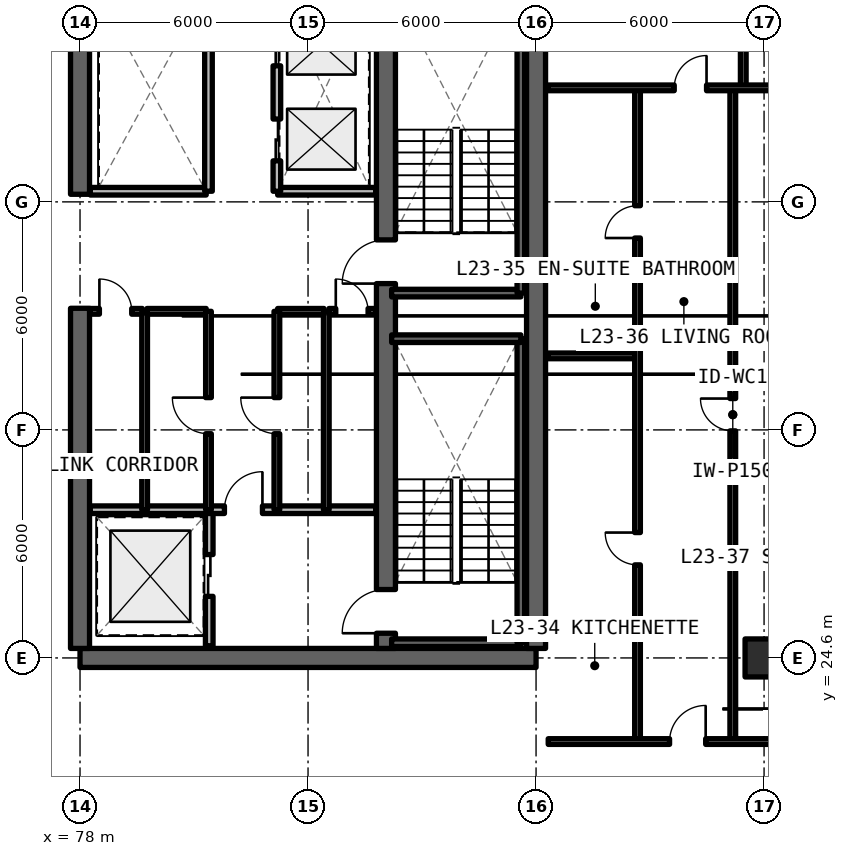
"""IFC4 building model, lengths in metres.
Left out: names, types, materials, properties, quantities, classifications, styles, units other than length and angle.
Written with IfcOpenShell. Run it as: python <this file> out.ifc"""

import sys

from ifc_helpers import new_model, si_unit, direction, frame, frame_2d, origin, origin_2d, place, context, subcontext, project, spatial, rectangle, extrude, element, fill, save


model = new_model("IFC4")
c1 = context("Model", 3, precision=1e-05, world=origin(), true_north=direction((0.0, 1.0)))
c2 = subcontext(c1, "Body", "Model", "MODEL_VIEW")
j1 = project(units=[si_unit("LENGTHUNIT", "METRE"), si_unit("PLANEANGLEUNIT", "RADIAN")], contexts=[c1])
p1 = place(None, origin())
s1 = spatial("IfcSite", under=j1, at=p1, CompositionType="ELEMENT")
p2 = place(p1, origin())
s2 = spatial("IfcBuilding", under=s1, at=p2, CompositionType="ELEMENT")
p3 = place(p2, frame((0.0, 0.0, 85.47)))
s3 = spatial("IfcBuildingStorey", under=s2, at=p3, CompositionType="ELEMENT", Elevation=85.47)
p4 = place(p3, frame((78.0, 24.6, 0.0), z_axis=(0.0, 0.0, 1.0), x_axis=(1.0, 0.0, 0.0)))
e1 = element("IfcWall", 1, at=p4, inside=s3, PredefinedType="SHEAR", context=c2, shape_type="SweptSolid", body=[
    extrude(rectangle(XDim=12.0, YDim=0.5, at=frame_2d((6.0, 0.0))), origin(), (0.0, 0.0, 1.0), 3.3),
])
p5 = place(p3, frame((90.0, 24.85, 0.0), z_axis=(0.0, 0.0, 1.0), x_axis=(0.0, 1.0, 0.0)))
e2 = element("IfcWall", 2, at=p5, inside=s3, PredefinedType="SHEAR", context=c2, shape_type="SweptSolid", body=[
    extrude(rectangle(XDim=17.5, YDim=0.5, at=frame_2d((8.75, 0.0))), origin(), (0.0, 0.0, 1.0), 3.3),
])
p6 = place(p3, frame((78.0, 24.85, 0.0), z_axis=(0.0, 0.0, 1.0), x_axis=(0.0, 1.0, 0.0)))
e3 = element("IfcWall", 3, at=p6, inside=s3, PredefinedType="SHEAR", context=c2, shape_type="SweptSolid", body=[
    extrude(rectangle(XDim=8.95, YDim=0.5, at=frame_2d((4.475, 0.0))), origin(), (0.0, 0.0, 1.0), 3.3),
])
p7 = place(p3, frame((78.0, 36.8, 0.0), z_axis=(0.0, 0.0, 1.0), x_axis=(0.0, 1.0, 0.0)))
e4 = element("IfcWall", 4, at=p7, inside=s3, PredefinedType="SHEAR", context=c2, shape_type="SweptSolid", body=[
    extrude(rectangle(XDim=5.55, YDim=0.5, at=frame_2d((2.775, 0.0))), origin(), (0.0, 0.0, 1.0), 3.3),
])
p8 = place(p3, frame((86.05, 24.85, 0.0), z_axis=(0.0, 0.0, 1.0), x_axis=(0.0, 1.0, 0.0)))
e5 = element("IfcWall", 5, at=p8, inside=s3, PredefinedType="SHEAR", context=c2, shape_type="SweptSolid", body=[
    extrude(rectangle(XDim=17.5, YDim=0.5, at=frame_2d((8.75, 0.0))), origin(), (0.0, 0.0, 1.0), 3.3),
])
p9 = place(p8, frame((0.4, 0.0, 0.0)))
e6 = element("IfcOpeningElement", 6, at=p9, cuts=e5, PredefinedType="OPENING", context=c2, shape_type="SweptSolid", body=[
    extrude(rectangle(XDim=1.15, YDim=2.15, at=frame_2d((0.575, 1.075))), frame((0.0, 0.26, 0.0), z_axis=(0.0, -1.0, 0.0), x_axis=(1.0, 0.0, 0.0)), (0.0, 0.0, 1.0), 0.52),
])
p10 = place(p8, frame((9.6, 0.0, 0.0)))
e7 = element("IfcOpeningElement", 7, at=p10, cuts=e5, PredefinedType="OPENING", context=c2, shape_type="SweptSolid", body=[
    extrude(rectangle(XDim=1.15, YDim=2.15, at=frame_2d((0.575, 1.075))), frame((0.0, 0.26, 0.0), z_axis=(0.0, -1.0, 0.0), x_axis=(1.0, 0.0, 0.0)), (0.0, 0.0, 1.0), 0.52),
])
p11 = place(p3, frame((96.0, 24.6, 0.0), z_axis=(0.0, 0.0, 1.0), x_axis=(1.0, 0.0, 0.0)))
e8 = element("IfcColumn", 8, at=p11, inside=s3, PredefinedType="COLUMN", context=c2, shape_type="SweptSolid", body=[
    extrude(rectangle(XDim=1.0, YDim=1.0, at=origin_2d()), origin(), (0.0, 0.0, 1.0), 3.3),
])
p12 = place(p3, frame((81.4, 24.92, 0.0), z_axis=(0.0, 0.0, 1.0), x_axis=(0.0, 1.0, 0.0)))
e9 = element("IfcWall", 9, at=p12, inside=s3, PredefinedType="SOLIDWALL", context=c2, shape_type="SweptSolid", body=[
    extrude(rectangle(XDim=3.58, YDim=0.2, at=frame_2d((1.79, 0.0))), origin(), (0.0, 0.0, 1.0), 2.35),
])
p13 = place(p12, frame((1.3, 0.0, 0.0)))
e10 = element("IfcOpeningElement", 10, at=p13, cuts=e9, PredefinedType="OPENING", context=c2, shape_type="SweptSolid", body=[
    extrude(rectangle(XDim=1.1, YDim=2.2, at=frame_2d((0.55, 1.1))), frame((0.0, 0.11, 0.0), z_axis=(0.0, -1.0, 0.0), x_axis=(1.0, 0.0, 0.0)), (0.0, 0.0, 1.0), 0.22),
])
p14 = place(p3, frame((78.27, 28.5, 0.0), z_axis=(0.0, 0.0, 1.0), x_axis=(1.0, 0.0, 0.0)))
e11 = element("IfcWall", 11, at=p14, inside=s3, PredefinedType="SOLIDWALL", context=c2, shape_type="SweptSolid", body=[
    extrude(rectangle(XDim=7.51, YDim=0.2, at=frame_2d((3.755, 0.0))), origin(), (0.0, 0.0, 1.0), 2.35),
])
p15 = place(p14, frame((3.53, 0.0, 0.0)))
e12 = element("IfcOpeningElement", 12, at=p15, cuts=e11, PredefinedType="OPENING", context=c2, shape_type="SweptSolid", body=[
    extrude(rectangle(XDim=1.0, YDim=2.15, at=frame_2d((0.5, 1.075))), frame((0.0, 0.11, 0.0), z_axis=(0.0, -1.0, 0.0), x_axis=(1.0, 0.0, 0.0)), (0.0, 0.0, 1.0), 0.22),
])
p16 = place(p3, frame((84.48, 28.5, 0.0), z_axis=(0.0, 0.0, 1.0), x_axis=(0.0, 1.0, 0.0)))
e13 = element("IfcWall", 13, at=p16, inside=s3, PredefinedType="SOLIDWALL", context=c2, shape_type="SweptSolid", body=[
    extrude(rectangle(XDim=5.22, YDim=0.15, at=frame_2d((2.61, 0.0))), origin(), (0.0, 0.0, 1.0), 2.35),
])
p17 = place(p3, frame((84.55, 33.72, 0.0), z_axis=(0.0, 0.0, 1.0), x_axis=(1.0, 0.0, 0.0)))
e14 = element("IfcWall", 14, at=p17, inside=s3, PredefinedType="SOLIDWALL", context=c2, shape_type="SweptSolid", body=[
    extrude(rectangle(XDim=1.23, YDim=0.15, at=frame_2d((0.615, 0.0))), origin(), (0.0, 0.0, 1.0), 2.35),
])
p18 = place(p17, frame((0.18, 0.0, 0.0)))
e15 = element("IfcOpeningElement", 15, at=p18, cuts=e14, PredefinedType="OPENING", context=c2, shape_type="SweptSolid", body=[
    extrude(rectangle(XDim=0.85, YDim=2.1, at=frame_2d((0.425, 1.05))), frame((0.0, 0.085, 0.0), z_axis=(0.0, -1.0, 0.0), x_axis=(1.0, 0.0, 0.0)), (0.0, 0.0, 1.0), 0.17),
])
p19 = place(p3, frame((83.2, 33.72, 0.0), z_axis=(0.0, 0.0, 1.0), x_axis=(1.0, 0.0, 0.0)))
e16 = element("IfcWall", 16, at=p19, inside=s3, PredefinedType="SOLIDWALL", context=c2, shape_type="SweptSolid", body=[
    extrude(rectangle(XDim=1.22, YDim=0.15, at=frame_2d((0.61, 0.0))), origin(), (0.0, 0.0, 1.0), 2.35),
])
p20 = place(p3, frame((83.18, 28.5, 0.0), z_axis=(0.0, 0.0, 1.0), x_axis=(0.0, 1.0, 0.0)))
e17 = element("IfcWall", 17, at=p20, inside=s3, PredefinedType="SOLIDWALL", context=c2, shape_type="SweptSolid", body=[
    extrude(rectangle(XDim=5.22, YDim=0.15, at=frame_2d((2.61, 0.0))), origin(), (0.0, 0.0, 1.0), 2.35),
])
p21 = place(p20, frame((2.0, 0.0, 0.0)))
e18 = element("IfcOpeningElement", 18, at=p21, cuts=e17, PredefinedType="OPENING", context=c2, shape_type="SweptSolid", body=[
    extrude(rectangle(XDim=0.95, YDim=2.15, at=frame_2d((0.475, 1.075))), frame((0.0, 0.085, 0.0), z_axis=(0.0, -1.0, 0.0), x_axis=(1.0, 0.0, 0.0)), (0.0, 0.0, 1.0), 0.17),
])
p22 = place(p3, frame((79.7, 28.5, 0.0), z_axis=(0.0, 0.0, 1.0), x_axis=(0.0, 1.0, 0.0)))
e19 = element("IfcWall", 19, at=p22, inside=s3, PredefinedType="SOLIDWALL", context=c2, shape_type="SweptSolid", body=[
    extrude(rectangle(XDim=5.22, YDim=0.15, at=frame_2d((2.61, 0.0))), origin(), (0.0, 0.0, 1.0), 2.35),
])
p23 = place(p3, frame((79.76, 33.72, 0.0), z_axis=(0.0, 0.0, 1.0), x_axis=(1.0, 0.0, 0.0)))
e20 = element("IfcWall", 20, at=p23, inside=s3, PredefinedType="SOLIDWALL", context=c2, shape_type="SweptSolid", body=[
    extrude(rectangle(XDim=1.56, YDim=0.15, at=frame_2d((0.78, 0.0))), origin(), (0.0, 0.0, 1.0), 2.35),
])
p24 = place(p3, frame((78.27, 33.72, 0.0), z_axis=(0.0, 0.0, 1.0), x_axis=(1.0, 0.0, 0.0)))
e21 = element("IfcWall", 21, at=p24, inside=s3, PredefinedType="SOLIDWALL", context=c2, shape_type="SweptSolid", body=[
    extrude(rectangle(XDim=1.37, YDim=0.15, at=frame_2d((0.685, 0.0))), origin(), (0.0, 0.0, 1.0), 2.35),
])
p25 = place(p24, frame((0.24, 0.0, 0.0)))
e22 = element("IfcOpeningElement", 22, at=p25, cuts=e21, PredefinedType="OPENING", context=c2, shape_type="SweptSolid", body=[
    extrude(rectangle(XDim=0.85, YDim=2.1, at=frame_2d((0.425, 1.05))), frame((0.0, 0.085, 0.0), z_axis=(0.0, -1.0, 0.0), x_axis=(1.0, 0.0, 0.0)), (0.0, 0.0, 1.0), 0.17),
])
p26 = place(p3, frame((81.38, 28.5, 0.0), z_axis=(0.0, 0.0, 1.0), x_axis=(0.0, 1.0, 0.0)))
e23 = element("IfcWall", 23, at=p26, inside=s3, PredefinedType="SOLIDWALL", context=c2, shape_type="SweptSolid", body=[
    extrude(rectangle(XDim=5.22, YDim=0.15, at=frame_2d((2.61, 0.0))), origin(), (0.0, 0.0, 1.0), 2.35),
])
p27 = place(p26, frame((2.0, 0.0, 0.0)))
e24 = element("IfcOpeningElement", 24, at=p27, cuts=e23, PredefinedType="OPENING", context=c2, shape_type="SweptSolid", body=[
    extrude(rectangle(XDim=0.95, YDim=2.15, at=frame_2d((0.475, 1.075))), frame((0.0, 0.085, 0.0), z_axis=(0.0, -1.0, 0.0), x_axis=(1.0, 0.0, 0.0)), (0.0, 0.0, 1.0), 0.17),
])
p28 = place(p3, frame((83.2, 36.88, 0.0), z_axis=(0.0, 0.0, 1.0), x_axis=(1.0, 0.0, 0.0)))
e25 = element("IfcWall", 25, at=p28, inside=s3, PredefinedType="SOLIDWALL", context=c2, shape_type="SweptSolid", body=[
    extrude(rectangle(XDim=2.58, YDim=0.2, at=frame_2d((1.29, 0.0))), origin(), (0.0, 0.0, 1.0), 2.35),
])
p29 = place(p3, frame((83.18, 36.88, 0.0), z_axis=(0.0, 0.0, 1.0), x_axis=(0.0, 1.0, 0.0)))
e26 = element("IfcWall", 26, at=p29, inside=s3, PredefinedType="SOLIDWALL", context=c2, shape_type="SweptSolid", body=[
    extrude(rectangle(XDim=5.42, YDim=0.2, at=frame_2d((2.71, 0.0))), origin(), (0.0, 0.0, 1.0), 2.35),
])
p30 = place(p29, frame((0.8, 0.0, 0.0)))
e27 = element("IfcOpeningElement", 27, at=p30, cuts=e26, PredefinedType="OPENING", context=c2, shape_type="SweptSolid", body=[
    extrude(rectangle(XDim=1.1, YDim=2.2, at=frame_2d((0.55, 1.1))), frame((0.0, 0.11, 0.0), z_axis=(0.0, -1.0, 0.0), x_axis=(1.0, 0.0, 0.0)), (0.0, 0.0, 1.0), 0.22),
])
p31 = place(p29, frame((3.3, 0.0, 0.0)))
e28 = element("IfcOpeningElement", 28, at=p31, cuts=e26, PredefinedType="OPENING", context=c2, shape_type="SweptSolid", body=[
    extrude(rectangle(XDim=1.1, YDim=2.2, at=frame_2d((0.55, 1.1))), frame((0.0, 0.11, 0.0), z_axis=(0.0, -1.0, 0.0), x_axis=(1.0, 0.0, 0.0)), (0.0, 0.0, 1.0), 0.22),
])
p32 = place(p3, frame((78.27, 36.88, 0.0), z_axis=(0.0, 0.0, 1.0), x_axis=(1.0, 0.0, 0.0)))
e29 = element("IfcWall", 29, at=p32, inside=s3, PredefinedType="SOLIDWALL", context=c2, shape_type="SweptSolid", body=[
    extrude(rectangle(XDim=3.05, YDim=0.2, at=frame_2d((1.525, 0.0))), origin(), (0.0, 0.0, 1.0), 2.35),
])
p33 = place(p3, frame((81.38, 36.88, 0.0), z_axis=(0.0, 0.0, 1.0), x_axis=(0.0, 1.0, 0.0)))
e30 = element("IfcWall", 30, at=p33, inside=s3, PredefinedType="SOLIDWALL", context=c2, shape_type="SweptSolid", body=[
    extrude(rectangle(XDim=5.42, YDim=0.2, at=frame_2d((2.71, 0.0))), origin(), (0.0, 0.0, 1.0), 2.35),
])
p34 = place(p3, frame((95.177, 22.4, 0.0), z_axis=(0.0, 0.0, 1.0), x_axis=(0.0, 1.0, 0.0)))
e31 = element("IfcWall", 31, at=p34, inside=s3, PredefinedType="PARTITIONING", context=c2, shape_type="SweptSolid", body=[
    extrude(rectangle(XDim=17.2, YDim=0.15, at=frame_2d((8.6, 0.0))), origin(), (0.0, 0.0, 1.0), 2.35),
])
p35 = place(p34, frame((8.175, 0.0, 0.0)))
e32 = element("IfcOpeningElement", 32, at=p35, cuts=e31, PredefinedType="OPENING", context=c2, shape_type="SweptSolid", body=[
    extrude(rectangle(XDim=0.85, YDim=2.1, at=frame_2d((0.425, 1.05))), frame((0.0, 0.085, 0.0), z_axis=(0.0, -1.0, 0.0), x_axis=(1.0, 0.0, 0.0)), (0.0, 0.0, 1.0), 0.17),
])
p36 = place(p3, frame((90.32, 32.548, 0.0), z_axis=(0.0, 0.0, 1.0), x_axis=(1.0, 0.0, 0.0)))
e33 = element("IfcWall", 33, at=p36, inside=s3, PredefinedType="PARTITIONING", context=c2, shape_type="SweptSolid", body=[
    extrude(rectangle(XDim=2.35, YDim=0.15, at=frame_2d((1.175, 0.0))), origin(), (0.0, 0.0, 1.0), 2.35),
])
p37 = place(p3, frame((92.67, 22.4, 0.0), z_axis=(0.0, 0.0, 1.0), x_axis=(0.0, 1.0, 0.0)))
e34 = element("IfcWall", 34, at=p37, inside=s3, PredefinedType="PARTITIONING", context=c2, shape_type="SweptSolid", body=[
    extrude(rectangle(XDim=17.2, YDim=0.15, at=frame_2d((8.6, 0.0))), origin(), (0.0, 0.0, 1.0), 2.35),
])
p38 = place(p37, frame((4.649, 0.0, 0.0)))
e35 = element("IfcOpeningElement", 35, at=p38, cuts=e34, PredefinedType="OPENING", context=c2, shape_type="SweptSolid", body=[
    extrude(rectangle(XDim=0.85, YDim=2.1, at=frame_2d((0.425, 1.05))), frame((0.0, 0.085, 0.0), z_axis=(0.0, -1.0, 0.0), x_axis=(1.0, 0.0, 0.0)), (0.0, 0.0, 1.0), 0.17),
])
p39 = place(p37, frame((13.249, 0.0, 0.0)))
e36 = element("IfcOpeningElement", 36, at=p39, cuts=e34, PredefinedType="OPENING", context=c2, shape_type="SweptSolid", body=[
    extrude(rectangle(XDim=0.85, YDim=2.1, at=frame_2d((0.425, 1.05))), frame((0.0, 0.085, 0.0), z_axis=(0.0, -1.0, 0.0), x_axis=(1.0, 0.0, 0.0)), (0.0, 0.0, 1.0), 0.17),
])
p40 = place(p3, frame((95.452, 39.6, 0.0), z_axis=(0.0, 0.0, 1.0), x_axis=(0.0, 1.0, 0.0)))
e37 = element("IfcWall", 37, at=p40, inside=s3, PredefinedType="PARTITIONING", context=c2, shape_type="SweptSolid", body=[
    extrude(rectangle(XDim=5.2, YDim=0.15, at=frame_2d((2.6, 0.0))), origin(), (0.0, 0.0, 1.0), 2.35),
])
p41 = place(p3, frame((90.32, 39.6, 0.0), z_axis=(0.0, 0.0, 1.0), x_axis=(1.0, 0.0, 0.0)))
e38 = element("IfcWall", 38, at=p41, inside=s3, PredefinedType="PARTITIONING", context=c2, shape_type="SweptSolid", body=[
    extrude(rectangle(XDim=9.87, YDim=0.15, at=frame_2d((4.935, 0.0))), origin(), (0.0, 0.0, 1.0), 2.35),
])
p42 = place(p41, frame((3.316, 0.0, 0.0)))
e39 = element("IfcOpeningElement", 39, at=p42, cuts=e38, PredefinedType="OPENING", context=c2, shape_type="SweptSolid", body=[
    extrude(rectangle(XDim=0.85, YDim=2.1, at=frame_2d((0.425, 1.05))), frame((0.0, 0.085, 0.0), z_axis=(0.0, -1.0, 0.0), x_axis=(1.0, 0.0, 0.0)), (0.0, 0.0, 1.0), 0.17),
])
p43 = place(p41, frame((7.876, 0.0, 0.0)))
e40 = element("IfcOpeningElement", 40, at=p43, cuts=e38, PredefinedType="OPENING", context=c2, shape_type="SweptSolid", body=[
    extrude(rectangle(XDim=0.85, YDim=2.1, at=frame_2d((0.425, 1.05))), frame((0.0, 0.085, 0.0), z_axis=(0.0, -1.0, 0.0), x_axis=(1.0, 0.0, 0.0)), (0.0, 0.0, 1.0), 0.17),
])
p44 = place(p3, frame((90.32, 22.4, 0.0), z_axis=(0.0, 0.0, 1.0), x_axis=(1.0, 0.0, 0.0)))
e41 = element("IfcWall", 41, at=p44, inside=s3, PredefinedType="SOLIDWALL", context=c2, shape_type="SweptSolid", body=[
    extrude(rectangle(XDim=9.87, YDim=0.15, at=frame_2d((4.935, 0.0))), origin(), (0.0, 0.0, 1.0), 2.35),
])
p45 = place(p44, frame((3.193, 0.0, 0.0)))
e42 = element("IfcOpeningElement", 42, at=p45, cuts=e41, PredefinedType="OPENING", context=c2, shape_type="SweptSolid", body=[
    extrude(rectangle(XDim=0.95, YDim=2.15, at=frame_2d((0.475, 1.075))), frame((0.0, 0.085, 0.0), z_axis=(0.0, -1.0, 0.0), x_axis=(1.0, 0.0, 0.0)), (0.0, 0.0, 1.0), 0.17),
])
p46 = place(p3, frame((86.2, 25.0, 0.0), z_axis=(0.0, 0.0, 1.0), x_axis=(1.0, 0.0, 0.0)))
e43 = element("IfcWall", 43, at=p46, inside=s3, PredefinedType="SOLIDWALL", context=c2, shape_type="SweptSolid", body=[
    extrude(rectangle(XDim=3.4, YDim=0.2, at=frame_2d((1.7, 0.0))), origin(), (0.0, 0.0, 1.0), 3.3),
])
p47 = place(p3, frame((89.6, 25.0, 0.0), z_axis=(0.0, 0.0, 1.0), x_axis=(0.0, 1.0, 0.0)))
e44 = element("IfcWall", 44, at=p47, inside=s3, PredefinedType="SOLIDWALL", context=c2, shape_type="SweptSolid", body=[
    extrude(rectangle(XDim=8.0, YDim=0.2, at=frame_2d((4.0, 0.0))), origin(), (0.0, 0.0, 1.0), 3.3),
])
for number, where, z_axis, x_axis in (
    (45, (89.6, 33.0, 0.0), (0.0, 0.0, 1.0), (-1.0, 0.0, 0.0)),
    (46, (86.2, 34.2, 0.0), (0.0, 0.0, 1.0), (1.0, 0.0, 0.0)),
):
    element("IfcWall", number, at=place(p3, frame(where, z_axis=z_axis, x_axis=x_axis)), inside=s3, PredefinedType="SOLIDWALL", context=c2, shape_type="SweptSolid", body=[
        extrude(rectangle(XDim=3.4, YDim=0.2, at=frame_2d((1.7, 0.0))), origin(), (0.0, 0.0, 1.0), 3.3),
    ])
p48 = place(p3, frame((89.6, 34.2, 0.0), z_axis=(0.0, 0.0, 1.0), x_axis=(0.0, 1.0, 0.0)))
e47 = element("IfcWall", 47, at=p48, inside=s3, PredefinedType="SOLIDWALL", context=c2, shape_type="SweptSolid", body=[
    extrude(rectangle(XDim=8.0, YDim=0.2, at=frame_2d((4.0, 0.0))), origin(), (0.0, 0.0, 1.0), 3.3),
])
p49 = place(p13, origin())
e48 = element("IfcDoor", 48, at=p49, inside=s3, OperationType="SLIDING_TO_LEFT", PredefinedType="DOOR", context=c2, shape_type="SweptSolid", body=[
    extrude(rectangle(XDim=1.1, YDim=2.2, at=frame_2d((0.55, 1.1))), frame((0.0, 0.025, 0.0), z_axis=(0.0, -1.0, 0.0), x_axis=(1.0, 0.0, 0.0)), (0.0, 0.0, 1.0), 0.05),
])
fill(e10, e48)
p50 = place(p15, origin())
e49 = element("IfcDoor", 49, at=p50, inside=s3, OperationType="SINGLE_SWING_RIGHT", PredefinedType="DOOR", context=c2, shape_type="SweptSolid", body=[
    extrude(rectangle(XDim=1.0, YDim=2.15, at=frame_2d((0.5, 1.075))), frame((0.0, 0.025, 0.0), z_axis=(0.0, -1.0, 0.0), x_axis=(1.0, 0.0, 0.0)), (0.0, 0.0, 1.0), 0.05),
])
fill(e12, e49)
p51 = place(p18, origin())
e50 = element("IfcDoor", 50, at=p51, inside=s3, OperationType="SINGLE_SWING_LEFT", PredefinedType="DOOR", context=c2, shape_type="SweptSolid", body=[
    extrude(rectangle(XDim=0.85, YDim=2.1, at=frame_2d((0.425, 1.05))), frame((0.0, 0.025, 0.0), z_axis=(0.0, -1.0, 0.0), x_axis=(1.0, 0.0, 0.0)), (0.0, 0.0, 1.0), 0.05),
])
fill(e15, e50)
p52 = place(p21, origin())
e51 = element("IfcDoor", 51, at=p52, inside=s3, OperationType="SINGLE_SWING_RIGHT", PredefinedType="DOOR", context=c2, shape_type="SweptSolid", body=[
    extrude(rectangle(XDim=0.95, YDim=2.15, at=frame_2d((0.475, 1.075))), frame((0.0, 0.025, 0.0), z_axis=(0.0, -1.0, 0.0), x_axis=(1.0, 0.0, 0.0)), (0.0, 0.0, 1.0), 0.05),
])
fill(e18, e51)
p53 = place(p25, origin())
e52 = element("IfcDoor", 52, at=p53, inside=s3, OperationType="SINGLE_SWING_LEFT", PredefinedType="DOOR", context=c2, shape_type="SweptSolid", body=[
    extrude(rectangle(XDim=0.85, YDim=2.1, at=frame_2d((0.425, 1.05))), frame((0.0, 0.025, 0.0), z_axis=(0.0, -1.0, 0.0), x_axis=(1.0, 0.0, 0.0)), (0.0, 0.0, 1.0), 0.05),
])
fill(e22, e52)
p54 = place(p27, origin())
e53 = element("IfcDoor", 53, at=p54, inside=s3, OperationType="SINGLE_SWING_RIGHT", PredefinedType="DOOR", context=c2, shape_type="SweptSolid", body=[
    extrude(rectangle(XDim=0.95, YDim=2.15, at=frame_2d((0.475, 1.075))), frame((0.0, 0.025, 0.0), z_axis=(0.0, -1.0, 0.0), x_axis=(1.0, 0.0, 0.0)), (0.0, 0.0, 1.0), 0.05),
])
fill(e24, e53)
p55 = place(p30, origin())
e54 = element("IfcDoor", 54, at=p55, inside=s3, OperationType="SLIDING_TO_LEFT", PredefinedType="DOOR", context=c2, shape_type="SweptSolid", body=[
    extrude(rectangle(XDim=1.1, YDim=2.2, at=frame_2d((0.55, 1.1))), frame((0.0, 0.025, 0.0), z_axis=(0.0, -1.0, 0.0), x_axis=(1.0, 0.0, 0.0)), (0.0, 0.0, 1.0), 0.05),
])
fill(e27, e54)
p56 = place(p31, origin())
e55 = element("IfcDoor", 55, at=p56, inside=s3, OperationType="SLIDING_TO_RIGHT", PredefinedType="DOOR", context=c2, shape_type="SweptSolid", body=[
    extrude(rectangle(XDim=1.1, YDim=2.2, at=frame_2d((0.55, 1.1))), frame((0.0, 0.025, 0.0), z_axis=(0.0, -1.0, 0.0), x_axis=(1.0, 0.0, 0.0)), (0.0, 0.0, 1.0), 0.05),
])
fill(e28, e55)
p57 = place(p35, origin())
e56 = element("IfcDoor", 56, at=p57, inside=s3, OperationType="SINGLE_SWING_RIGHT", PredefinedType="DOOR", context=c2, shape_type="SweptSolid", body=[
    extrude(rectangle(XDim=0.85, YDim=2.1, at=frame_2d((0.425, 1.05))), frame((0.0, 0.025, 0.0), z_axis=(0.0, -1.0, 0.0), x_axis=(1.0, 0.0, 0.0)), (0.0, 0.0, 1.0), 0.05),
])
fill(e32, e56)
p58 = place(p38, origin())
e57 = element("IfcDoor", 57, at=p58, inside=s3, OperationType="SINGLE_SWING_RIGHT", PredefinedType="DOOR", context=c2, shape_type="SweptSolid", body=[
    extrude(rectangle(XDim=0.85, YDim=2.1, at=frame_2d((0.425, 1.05))), frame((0.0, 0.025, 0.0), z_axis=(0.0, -1.0, 0.0), x_axis=(1.0, 0.0, 0.0)), (0.0, 0.0, 1.0), 0.05),
])
fill(e35, e57)
p59 = place(p39, origin())
e58 = element("IfcDoor", 58, at=p59, inside=s3, OperationType="SINGLE_SWING_LEFT", PredefinedType="DOOR", context=c2, shape_type="SweptSolid", body=[
    extrude(rectangle(XDim=0.85, YDim=2.1, at=frame_2d((0.425, 1.05))), frame((0.0, 0.025, 0.0), z_axis=(0.0, -1.0, 0.0), x_axis=(1.0, 0.0, 0.0)), (0.0, 0.0, 1.0), 0.05),
])
fill(e36, e58)
p60 = place(p42, origin())
e59 = element("IfcDoor", 59, at=p60, inside=s3, OperationType="SINGLE_SWING_RIGHT", PredefinedType="DOOR", context=c2, shape_type="SweptSolid", body=[
    extrude(rectangle(XDim=0.85, YDim=2.1, at=frame_2d((0.425, 1.05))), frame((0.0, 0.025, 0.0), z_axis=(0.0, -1.0, 0.0), x_axis=(1.0, 0.0, 0.0)), (0.0, 0.0, 1.0), 0.05),
])
fill(e39, e59)
p61 = place(p45, origin())
e60 = element("IfcDoor", 60, at=p61, inside=s3, OperationType="SINGLE_SWING_RIGHT", PredefinedType="DOOR", context=c2, shape_type="SweptSolid", body=[
    extrude(rectangle(XDim=0.95, YDim=2.15, at=frame_2d((0.475, 1.075))), frame((0.0, 0.025, 0.0), z_axis=(0.0, -1.0, 0.0), x_axis=(1.0, 0.0, 0.0)), (0.0, 0.0, 1.0), 0.05),
])
fill(e42, e60)
p62 = place(p9, origin())
e61 = element("IfcDoor", 61, at=p62, inside=s3, OperationType="SINGLE_SWING_LEFT", PredefinedType="DOOR", context=c2, shape_type="SweptSolid", body=[
    extrude(rectangle(XDim=1.15, YDim=2.15, at=frame_2d((0.575, 1.075))), frame((0.0, 0.025, 0.0), z_axis=(0.0, -1.0, 0.0), x_axis=(1.0, 0.0, 0.0)), (0.0, 0.0, 1.0), 0.05),
])
fill(e6, e61)
p63 = place(p10, origin())
e62 = element("IfcDoor", 62, at=p63, inside=s3, OperationType="SINGLE_SWING_RIGHT", PredefinedType="DOOR", context=c2, shape_type="SweptSolid", body=[
    extrude(rectangle(XDim=1.15, YDim=2.15, at=frame_2d((0.575, 1.075))), frame((0.0, 0.025, 0.0), z_axis=(0.0, -1.0, 0.0), x_axis=(1.0, 0.0, 0.0)), (0.0, 0.0, 1.0), 0.05),
])
fill(e7, e62)
save(model, sys.argv[1])
